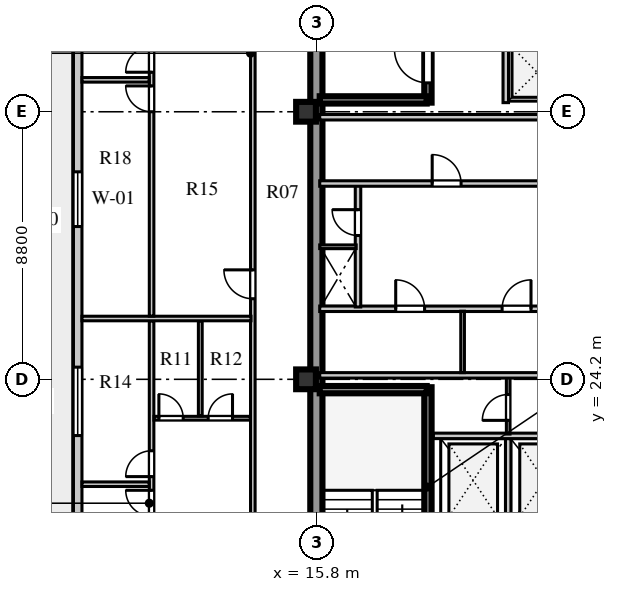
"""IFC4 building model, lengths in metres.
Left out: names, types, materials, properties, quantities, classifications, styles, units other than length and angle.
Written with IfcOpenShell. Run it as: python <this file> out.ifc"""

import sys

from ifc_helpers import new_model, si_unit, direction, frame, frame_2d, origin, origin_2d, place, context, subcontext, project, spatial, rectangle, extrude, element, fill, save


model = new_model("IFC4")
c1 = context("Model", 3, precision=1e-05, world=origin(), true_north=direction((0.0, 1.0)))
c2 = subcontext(c1, "Body", "Model", "MODEL_VIEW")
j1 = project(units=[si_unit("LENGTHUNIT", "METRE"), si_unit("PLANEANGLEUNIT", "RADIAN")], contexts=[c1])
p1 = place(None, origin())
s1 = spatial("IfcSite", under=j1, at=p1, CompositionType="ELEMENT")
p2 = place(p1, origin())
s2 = spatial("IfcBuilding", under=s1, at=p2, CompositionType="ELEMENT")
p3 = place(p2, frame((0.0, 0.0, 237.5)))
s3 = spatial("IfcBuildingStorey", under=s2, at=p3, CompositionType="ELEMENT", Elevation=237.5)
p4 = place(p3, frame((15.79, 15.81, 0.0), z_axis=(0.0, 0.0, 1.0), x_axis=(0.0, 1.0, 0.0)))
e1 = element("IfcWall", 1, at=p4, inside=s3, PredefinedType="SHEAR", context=c2, shape_type="SweptSolid", body=[
    extrude(rectangle(XDim=25.63, YDim=0.4, at=frame_2d((12.815, 0.0))), origin(), (0.0, 0.0, 1.0), 3.66),
])
for number, where, z_axis, x_axis in (
    (2, (15.45, 24.2, 0.0), (0.0, 0.0, 1.0), (1.0, 0.0, 0.0)),
    (3, (15.45, 33.0, 0.0), (0.0, 0.0, 1.0), (1.0, 0.0, 0.0)),
):
    element("IfcColumn", number, at=place(p3, frame(where, z_axis=z_axis, x_axis=x_axis)), inside=s3, PredefinedType="COLUMN", context=c2, shape_type="SweptSolid", body=[
        extrude(rectangle(XDim=0.65, YDim=0.65, at=origin_2d()), origin(), (0.0, 0.0, 1.0), 3.66),
    ])
p5 = place(p3, frame((7.94, 44.07, 0.0), z_axis=(0.0, 0.0, 1.0), x_axis=(0.0, -1.0, 0.0)))
e4 = element("IfcWall", 4, at=p5, inside=s3, PredefinedType="STANDARD", context=c2, shape_type="SweptSolid", body=[
    extrude(rectangle(XDim=30.94, YDim=0.28, at=frame_2d((15.47, 0.0))), origin(), (0.0, 0.0, 1.0), 3.66),
])
p6 = place(p5, frame((29.325, 0.0, 0.8)))
e5 = element("IfcOpeningElement", 5, at=p6, cuts=e4, PredefinedType="OPENING", context=c2, shape_type="SweptSolid", body=[
    extrude(rectangle(XDim=0.95, YDim=1.65, at=frame_2d((0.475, 0.825))), frame((0.0, 0.15, 0.0), z_axis=(0.0, -1.0, 0.0), x_axis=(1.0, 0.0, 0.0)), (0.0, 0.0, 1.0), 0.3),
])
p7 = place(p5, frame((27.28, 0.0, 0.0)))
e6 = element("IfcOpeningElement", 6, at=p7, cuts=e4, PredefinedType="OPENING", context=c2, shape_type="SweptSolid", body=[
    extrude(rectangle(XDim=1.0, YDim=2.05, at=frame_2d((0.5, 1.025))), frame((0.0, 0.15, 0.0), z_axis=(0.0, -1.0, 0.0), x_axis=(1.0, 0.0, 0.0)), (0.0, 0.0, 1.0), 0.3),
])
p8 = place(p5, frame((24.295, 0.0, 0.8)))
e7 = element("IfcOpeningElement", 7, at=p8, cuts=e4, PredefinedType="OPENING", context=c2, shape_type="SweptSolid", body=[
    extrude(rectangle(XDim=1.95, YDim=2.0, at=frame_2d((0.975, 1.0))), frame((0.0, 0.15, 0.0), z_axis=(0.0, -1.0, 0.0), x_axis=(1.0, 0.0, 0.0)), (0.0, 0.0, 1.0), 0.3),
])
p9 = place(p5, frame((19.47, 0.0, 0.8)))
e8 = element("IfcOpeningElement", 8, at=p9, cuts=e4, PredefinedType="OPENING", context=c2, shape_type="SweptSolid", body=[
    extrude(rectangle(XDim=2.25, YDim=2.0, at=frame_2d((1.125, 1.0))), frame((0.0, 0.15, 0.0), z_axis=(0.0, -1.0, 0.0), x_axis=(1.0, 0.0, 0.0)), (0.0, 0.0, 1.0), 0.3),
])
p10 = place(p5, frame((13.045, 0.0, 0.8)))
e9 = element("IfcOpeningElement", 9, at=p10, cuts=e4, PredefinedType="OPENING", context=c2, shape_type="SweptSolid", body=[
    extrude(rectangle(XDim=1.8, YDim=2.0, at=frame_2d((0.9, 1.0))), frame((0.0, 0.15, 0.0), z_axis=(0.0, -1.0, 0.0), x_axis=(1.0, 0.0, 0.0)), (0.0, 0.0, 1.0), 0.3),
])
p11 = place(p5, frame((5.345, 0.0, 0.8)))
e10 = element("IfcOpeningElement", 10, at=p11, cuts=e4, PredefinedType="OPENING", context=c2, shape_type="SweptSolid", body=[
    extrude(rectangle(XDim=1.5, YDim=2.0, at=frame_2d((0.75, 1.0))), frame((0.0, 0.15, 0.0), z_axis=(0.0, -1.0, 0.0), x_axis=(1.0, 0.0, 0.0)), (0.0, 0.0, 1.0), 0.3),
])
p12 = place(p5, frame((0.665, 0.0, 0.8)))
e11 = element("IfcOpeningElement", 11, at=p12, cuts=e4, PredefinedType="OPENING", context=c2, shape_type="SweptSolid", body=[
    extrude(rectangle(XDim=0.95, YDim=1.65, at=frame_2d((0.475, 0.825))), frame((0.0, 0.15, 0.0), z_axis=(0.0, -1.0, 0.0), x_axis=(1.0, 0.0, 0.0)), (0.0, 0.0, 1.0), 0.3),
])
p13 = place(p3, frame((19.46, 15.74, 0.0), z_axis=(0.0, 0.0, 1.0), x_axis=(0.0, 1.0, 0.0)))
e12 = element("IfcWall", 12, at=p13, inside=s3, PredefinedType="SHEAR", context=c2, shape_type="SweptSolid", body=[
    extrude(rectangle(XDim=8.2, YDim=0.24, at=frame_2d((4.1, 0.0))), origin(), (0.0, 0.0, 1.0), 3.9),
])
p14 = place(p13, frame((0.45, 0.0, 0.0)))
e13 = element("IfcOpeningElement", 13, at=p14, cuts=e12, PredefinedType="OPENING", context=c2, shape_type="SweptSolid", body=[
    extrude(rectangle(XDim=1.1, YDim=2.1, at=frame_2d((0.55, 1.05))), frame((0.0, 0.13, 0.0), z_axis=(0.0, -1.0, 0.0), x_axis=(1.0, 0.0, 0.0)), (0.0, 0.0, 1.0), 0.26),
])
p15 = place(p3, frame((15.9, 23.86, 0.0), z_axis=(0.0, 0.0, 1.0), x_axis=(1.0, 0.0, 0.0)))
e14 = element("IfcWall", 14, at=p15, inside=s3, PredefinedType="SHEAR", context=c2, shape_type="SweptSolid", body=[
    extrude(rectangle(XDim=3.52, YDim=0.24, at=frame_2d((1.76, 0.0))), origin(), (0.0, 0.0, 1.0), 3.9),
])
p16 = place(p3, frame((22.1, 19.51, 0.0), z_axis=(0.0, 0.0, 1.0), x_axis=(0.0, 1.0, 0.0)))
e15 = element("IfcWall", 15, at=p16, inside=s3, PredefinedType="SOLIDWALL", context=c2, shape_type="SweptSolid", body=[
    extrude(rectangle(XDim=2.74, YDim=0.18, at=frame_2d((1.37, 0.0))), origin(), (0.0, 0.0, 1.0), 3.66),
])
p17 = place(p3, frame((19.64, 22.34, 0.0), z_axis=(0.0, 0.0, 1.0), x_axis=(1.0, 0.0, 0.0)))
e16 = element("IfcWall", 16, at=p17, inside=s3, PredefinedType="SOLIDWALL", context=c2, shape_type="SweptSolid", body=[
    extrude(rectangle(XDim=4.94, YDim=0.18, at=frame_2d((2.47, 0.0))), origin(), (0.0, 0.0, 1.0), 3.66),
])
p18 = place(p3, frame((22.1, 22.4, 0.0), z_axis=(0.0, 0.0, 1.0), x_axis=(0.0, 1.0, 0.0)))
e17 = element("IfcWall", 17, at=p18, inside=s3, PredefinedType="PARTITIONING", context=c2, shape_type="SweptSolid", body=[
    extrude(rectangle(XDim=1.88, YDim=0.12, at=frame_2d((0.94, 0.0))), origin(), (0.0, 0.0, 1.0), 3.66),
])
p19 = place(p18, frame((0.45, 0.0, 0.0)))
e18 = element("IfcOpeningElement", 18, at=p19, cuts=e17, PredefinedType="OPENING", context=c2, shape_type="SweptSolid", body=[
    extrude(rectangle(XDim=0.85, YDim=2.06, at=frame_2d((0.425, 1.03))), frame((0.0, 0.07, 0.0), z_axis=(0.0, -1.0, 0.0), x_axis=(1.0, 0.0, 0.0)), (0.0, 0.0, 1.0), 0.14),
])
p20 = place(p3, frame((15.9, 26.52, 0.0), z_axis=(0.0, 0.0, 1.0), x_axis=(1.0, 0.0, 0.0)))
e19 = element("IfcWall", 19, at=p20, inside=s3, PredefinedType="SOLIDWALL", context=c2, shape_type="SweptSolid", body=[
    extrude(rectangle(XDim=8.68, YDim=0.18, at=frame_2d((4.34, 0.0))), origin(), (0.0, 0.0, 1.0), 3.66),
])
p21 = place(p20, frame((2.5, 0.0, 0.0)))
e20 = element("IfcOpeningElement", 20, at=p21, cuts=e19, PredefinedType="OPENING", context=c2, shape_type="SweptSolid", body=[
    extrude(rectangle(XDim=0.95, YDim=2.1, at=frame_2d((0.475, 1.05))), frame((0.0, 0.1, 0.0), z_axis=(0.0, -1.0, 0.0), x_axis=(1.0, 0.0, 0.0)), (0.0, 0.0, 1.0), 0.2),
])
p22 = place(p20, frame((6.0, 0.0, 0.0)))
e21 = element("IfcOpeningElement", 21, at=p22, cuts=e19, PredefinedType="OPENING", context=c2, shape_type="SweptSolid", body=[
    extrude(rectangle(XDim=0.95, YDim=2.1, at=frame_2d((0.475, 1.05))), frame((0.0, 0.1, 0.0), z_axis=(0.0, -1.0, 0.0), x_axis=(1.0, 0.0, 0.0)), (0.0, 0.0, 1.0), 0.2),
])
p23 = place(p3, frame((15.9, 24.33, 0.0), z_axis=(0.0, 0.0, 1.0), x_axis=(1.0, 0.0, 0.0)))
e22 = element("IfcWall", 22, at=p23, inside=s3, PredefinedType="SOLIDWALL", context=c2, shape_type="SweptSolid", body=[
    extrude(rectangle(XDim=8.68, YDim=0.18, at=frame_2d((4.34, 0.0))), origin(), (0.0, 0.0, 1.0), 3.06),
])
p24 = place(p3, frame((20.6, 24.42, 0.0), z_axis=(0.0, 0.0, 1.0), x_axis=(0.0, 1.0, 0.0)))
e23 = element("IfcWall", 23, at=p24, inside=s3, PredefinedType="PARTITIONING", context=c2, shape_type="SweptSolid", body=[
    extrude(rectangle(XDim=2.02, YDim=0.12, at=frame_2d((1.01, 0.0))), origin(), (0.0, 0.0, 1.0), 3.66),
])
p25 = place(p3, frame((17.16, 26.58, 0.0), z_axis=(0.0, 0.0, 1.0), x_axis=(0.0, 1.0, 0.0)))
e24 = element("IfcWall", 24, at=p25, inside=s3, PredefinedType="SOLIDWALL", context=c2, shape_type="SweptSolid", body=[
    extrude(rectangle(XDim=4.02, YDim=0.18, at=frame_2d((2.01, 0.0))), origin(), (0.0, 0.0, 1.0), 3.66),
])
p26 = place(p25, frame((2.35, 0.0, 0.0)))
e25 = element("IfcOpeningElement", 25, at=p26, cuts=e24, PredefinedType="OPENING", context=c2, shape_type="SweptSolid", body=[
    extrude(rectangle(XDim=0.85, YDim=2.06, at=frame_2d((0.425, 1.03))), frame((0.0, 0.1, 0.0), z_axis=(0.0, -1.0, 0.0), x_axis=(1.0, 0.0, 0.0)), (0.0, 0.0, 1.0), 0.2),
])
p27 = place(p3, frame((15.9, 28.56, 0.0), z_axis=(0.0, 0.0, 1.0), x_axis=(1.0, 0.0, 0.0)))
e26 = element("IfcWall", 26, at=p27, inside=s3, PredefinedType="PARTITIONING", context=c2, shape_type="SweptSolid", body=[
    extrude(rectangle(XDim=1.2, YDim=0.12, at=frame_2d((0.6, 0.0))), origin(), (0.0, 0.0, 1.0), 3.66),
])
p28 = place(p3, frame((15.9, 30.64, 0.0), z_axis=(0.0, 0.0, 1.0), x_axis=(1.0, 0.0, 0.0)))
e27 = element("IfcWall", 27, at=p28, inside=s3, PredefinedType="SOLIDWALL", context=c2, shape_type="SweptSolid", body=[
    extrude(rectangle(XDim=8.68, YDim=0.18, at=frame_2d((4.34, 0.0))), origin(), (0.0, 0.0, 1.0), 3.66),
])
p29 = place(p28, frame((3.7, 0.0, 0.0)))
e28 = element("IfcOpeningElement", 28, at=p29, cuts=e27, PredefinedType="OPENING", context=c2, shape_type="SweptSolid", body=[
    extrude(rectangle(XDim=0.95, YDim=2.1, at=frame_2d((0.475, 1.05))), frame((0.0, 0.1, 0.0), z_axis=(0.0, -1.0, 0.0), x_axis=(1.0, 0.0, 0.0)), (0.0, 0.0, 1.0), 0.2),
])
p30 = place(p3, frame((15.9, 32.82, 0.0), z_axis=(0.0, 0.0, 1.0), x_axis=(1.0, 0.0, 0.0)))
e29 = element("IfcWall", 29, at=p30, inside=s3, PredefinedType="SOLIDWALL", context=c2, shape_type="SweptSolid", body=[
    extrude(rectangle(XDim=8.68, YDim=0.18, at=frame_2d((4.34, 0.0))), origin(), (0.0, 0.0, 1.0), 3.06),
])
p31 = place(p3, frame((19.46, 33.3, 0.0), z_axis=(0.0, 0.0, 1.0), x_axis=(0.0, 1.0, 0.0)))
e30 = element("IfcWall", 30, at=p31, inside=s3, PredefinedType="SHEAR", context=c2, shape_type="SweptSolid", body=[
    extrude(rectangle(XDim=8.18, YDim=0.24, at=frame_2d((4.09, 0.0))), origin(), (0.0, 0.0, 1.0), 3.9),
])
p32 = place(p31, frame((0.65, 0.0, 0.0)))
e31 = element("IfcOpeningElement", 31, at=p32, cuts=e30, PredefinedType="OPENING", context=c2, shape_type="SweptSolid", body=[
    extrude(rectangle(XDim=1.1, YDim=2.1, at=frame_2d((0.55, 1.05))), frame((0.0, 0.13, 0.0), z_axis=(0.0, -1.0, 0.0), x_axis=(1.0, 0.0, 0.0)), (0.0, 0.0, 1.0), 0.26),
])
p33 = place(p3, frame((15.9, 33.39, 0.0), z_axis=(0.0, 0.0, 1.0), x_axis=(1.0, 0.0, 0.0)))
e32 = element("IfcWall", 32, at=p33, inside=s3, PredefinedType="SHEAR", context=c2, shape_type="SweptSolid", body=[
    extrude(rectangle(XDim=3.52, YDim=0.24, at=frame_2d((1.76, 0.0))), origin(), (0.0, 0.0, 1.0), 3.9),
])
p34 = place(p3, frame((22.02, 33.3, 0.0), z_axis=(0.0, 0.0, 1.0), x_axis=(0.0, 1.0, 0.0)))
e33 = element("IfcWall", 33, at=p34, inside=s3, PredefinedType="SOLIDWALL", context=c2, shape_type="SweptSolid", body=[
    extrude(rectangle(XDim=2.01, YDim=0.18, at=frame_2d((1.005, 0.0))), origin(), (0.0, 0.0, 1.0), 3.66),
])
p35 = place(p3, frame((13.7, 15.3, 0.0), z_axis=(0.0, 0.0, 1.0), x_axis=(0.0, 1.0, 0.0)))
e34 = element("IfcWall", 34, at=p35, inside=s3, PredefinedType="PARTITIONING", context=c2, shape_type="SweptSolid", body=[
    extrude(rectangle(XDim=26.6, YDim=0.15, at=frame_2d((13.3, 0.0))), origin(), (0.0, 0.0, 1.0), 3.66),
])
p36 = place(p35, frame((0.65, 0.0, 0.0)))
e35 = element("IfcOpeningElement", 35, at=p36, cuts=e34, PredefinedType="OPENING", context=c2, shape_type="SweptSolid", body=[
    extrude(rectangle(XDim=0.95, YDim=2.1, at=frame_2d((0.475, 1.05))), frame((0.0, 0.085, 0.0), z_axis=(0.0, -1.0, 0.0), x_axis=(1.0, 0.0, 0.0)), (0.0, 0.0, 1.0), 0.17),
])
p37 = place(p35, frame((11.55, 0.0, 0.0)))
e36 = element("IfcOpeningElement", 36, at=p37, cuts=e34, PredefinedType="OPENING", context=c2, shape_type="SweptSolid", body=[
    extrude(rectangle(XDim=0.95, YDim=2.1, at=frame_2d((0.475, 1.05))), frame((0.0, 0.085, 0.0), z_axis=(0.0, -1.0, 0.0), x_axis=(1.0, 0.0, 0.0)), (0.0, 0.0, 1.0), 0.17),
])
p38 = place(p3, frame((10.37, 15.38, 0.0), z_axis=(0.0, 0.0, 1.0), x_axis=(0.0, 1.0, 0.0)))
e37 = element("IfcWall", 37, at=p38, inside=s3, PredefinedType="PARTITIONING", context=c2, shape_type="SweptSolid", body=[
    extrude(rectangle(XDim=10.74, YDim=0.15, at=frame_2d((5.37, 0.0))), origin(), (0.0, 0.0, 1.0), 3.66),
])
p39 = place(p38, frame((4.32, 0.0, 0.0)))
e38 = element("IfcOpeningElement", 38, at=p39, cuts=e37, PredefinedType="OPENING", context=c2, shape_type="SweptSolid", body=[
    extrude(rectangle(XDim=0.85, YDim=2.08, at=frame_2d((0.425, 1.04))), frame((0.0, 0.085, 0.0), z_axis=(0.0, -1.0, 0.0), x_axis=(1.0, 0.0, 0.0)), (0.0, 0.0, 1.0), 0.17),
])
p40 = place(p38, frame((5.62, 0.0, 0.0)))
e39 = element("IfcOpeningElement", 39, at=p40, cuts=e37, PredefinedType="OPENING", context=c2, shape_type="SweptSolid", body=[
    extrude(rectangle(XDim=0.85, YDim=2.08, at=frame_2d((0.425, 1.04))), frame((0.0, 0.085, 0.0), z_axis=(0.0, -1.0, 0.0), x_axis=(1.0, 0.0, 0.0)), (0.0, 0.0, 1.0), 0.17),
])
p41 = place(p3, frame((10.45, 22.92, 0.0), z_axis=(0.0, 0.0, 1.0), x_axis=(1.0, 0.0, 0.0)))
e40 = element("IfcWall", 40, at=p41, inside=s3, PredefinedType="PLUMBINGWALL", context=c2, shape_type="SweptSolid", body=[
    extrude(rectangle(XDim=3.17, YDim=0.125, at=frame_2d((1.585, 0.0))), origin(), (0.0, 0.0, 1.0), 3.66),
])
p42 = place(p41, frame((0.16, 0.0, 0.0)))
e41 = element("IfcOpeningElement", 41, at=p42, cuts=e40, PredefinedType="OPENING", context=c2, shape_type="SweptSolid", body=[
    extrude(rectangle(XDim=0.8, YDim=2.05, at=frame_2d((0.4, 1.025))), frame((0.0, 0.073, 0.0), z_axis=(0.0, -1.0, 0.0), x_axis=(1.0, 0.0, 0.0)), (0.0, 0.0, 1.0), 0.145),
])
p43 = place(p41, frame((1.782, 0.0, 0.0)))
e42 = element("IfcOpeningElement", 42, at=p43, cuts=e40, PredefinedType="OPENING", context=c2, shape_type="SweptSolid", body=[
    extrude(rectangle(XDim=0.8, YDim=2.05, at=frame_2d((0.4, 1.025))), frame((0.0, 0.073, 0.0), z_axis=(0.0, -1.0, 0.0), x_axis=(1.0, 0.0, 0.0)), (0.0, 0.0, 1.0), 0.145),
])
p44 = place(p3, frame((11.972, 23.0, 0.0), z_axis=(0.0, 0.0, 1.0), x_axis=(0.0, 1.0, 0.0)))
e43 = element("IfcWall", 43, at=p44, inside=s3, PredefinedType="PLUMBINGWALL", context=c2, shape_type="SweptSolid", body=[
    extrude(rectangle(XDim=3.12, YDim=0.125, at=frame_2d((1.56, 0.0))), origin(), (0.0, 0.0, 1.0), 3.66),
])
p45 = place(p3, frame((8.08, 20.75, 0.0), z_axis=(0.0, 0.0, 1.0), x_axis=(1.0, 0.0, 0.0)))
e44 = element("IfcWall", 44, at=p45, inside=s3, PredefinedType="PARTITIONING", context=c2, shape_type="SweptSolid", body=[
    extrude(rectangle(XDim=2.21, YDim=0.15, at=frame_2d((1.105, 0.0))), origin(), (0.0, 0.0, 1.0), 3.66),
])
p46 = place(p3, frame((8.08, 26.2, 0.0), z_axis=(0.0, 0.0, 1.0), x_axis=(1.0, 0.0, 0.0)))
e45 = element("IfcWall", 45, at=p46, inside=s3, PredefinedType="PARTITIONING", context=c2, shape_type="SweptSolid", body=[
    extrude(rectangle(XDim=5.56, YDim=0.15, at=frame_2d((2.78, 0.0))), origin(), (0.0, 0.0, 1.0), 3.66),
])
p47 = place(p3, frame((10.37, 26.28, 0.0), z_axis=(0.0, 0.0, 1.0), x_axis=(0.0, 1.0, 0.0)))
e46 = element("IfcWall", 46, at=p47, inside=s3, PredefinedType="PARTITIONING", context=c2, shape_type="SweptSolid", body=[
    extrude(rectangle(XDim=15.54, YDim=0.15, at=frame_2d((7.77, 0.0))), origin(), (0.0, 0.0, 1.0), 3.66),
])
p48 = place(p47, frame((6.72, 0.0, 0.0)))
e47 = element("IfcOpeningElement", 47, at=p48, cuts=e46, PredefinedType="OPENING", context=c2, shape_type="SweptSolid", body=[
    extrude(rectangle(XDim=0.85, YDim=2.08, at=frame_2d((0.425, 1.04))), frame((0.0, 0.085, 0.0), z_axis=(0.0, -1.0, 0.0), x_axis=(1.0, 0.0, 0.0)), (0.0, 0.0, 1.0), 0.17),
])
p49 = place(p47, frame((8.02, 0.0, 0.0)))
e48 = element("IfcOpeningElement", 48, at=p49, cuts=e46, PredefinedType="OPENING", context=c2, shape_type="SweptSolid", body=[
    extrude(rectangle(XDim=0.85, YDim=2.08, at=frame_2d((0.425, 1.04))), frame((0.0, 0.085, 0.0), z_axis=(0.0, -1.0, 0.0), x_axis=(1.0, 0.0, 0.0)), (0.0, 0.0, 1.0), 0.17),
])
p50 = place(p3, frame((8.08, 34.05, 0.0), z_axis=(0.0, 0.0, 1.0), x_axis=(1.0, 0.0, 0.0)))
e49 = element("IfcWall", 49, at=p50, inside=s3, PredefinedType="PARTITIONING", context=c2, shape_type="SweptSolid", body=[
    extrude(rectangle(XDim=2.21, YDim=0.15, at=frame_2d((1.105, 0.0))), origin(), (0.0, 0.0, 1.0), 3.66),
])
p51 = place(p9, origin())
e50 = element("IfcWindow", 50, at=p51, inside=s3, PartitioningType="SINGLE_PANEL", PredefinedType="WINDOW", context=c2, shape_type="SweptSolid", body=[
    extrude(rectangle(XDim=2.25, YDim=2.0, at=frame_2d((1.125, 1.0))), frame((0.0, 0.03, 0.0), z_axis=(0.0, -1.0, 0.0), x_axis=(1.0, 0.0, 0.0)), (0.0, 0.0, 1.0), 0.06),
])
fill(e8, e50)
p52 = place(p10, origin())
e51 = element("IfcWindow", 51, at=p52, inside=s3, PartitioningType="SINGLE_PANEL", PredefinedType="WINDOW", context=c2, shape_type="SweptSolid", body=[
    extrude(rectangle(XDim=1.8, YDim=2.0, at=frame_2d((0.9, 1.0))), frame((0.0, 0.03, 0.0), z_axis=(0.0, -1.0, 0.0), x_axis=(1.0, 0.0, 0.0)), (0.0, 0.0, 1.0), 0.06),
])
fill(e9, e51)
p53 = place(p19, origin())
e52 = element("IfcDoor", 52, at=p53, inside=s3, OperationType="SINGLE_SWING_LEFT", PredefinedType="DOOR", context=c2, shape_type="SweptSolid", body=[
    extrude(rectangle(XDim=0.85, YDim=2.06, at=frame_2d((0.425, 1.03))), frame((0.0, 0.025, 0.0), z_axis=(0.0, -1.0, 0.0), x_axis=(1.0, 0.0, 0.0)), (0.0, 0.0, 1.0), 0.05),
])
fill(e18, e52)
p54 = place(p21, origin())
e53 = element("IfcDoor", 53, at=p54, inside=s3, OperationType="SINGLE_SWING_LEFT", PredefinedType="DOOR", context=c2, shape_type="SweptSolid", body=[
    extrude(rectangle(XDim=0.95, YDim=2.1, at=frame_2d((0.475, 1.05))), frame((0.0, 0.025, 0.0), z_axis=(0.0, -1.0, 0.0), x_axis=(1.0, 0.0, 0.0)), (0.0, 0.0, 1.0), 0.05),
])
fill(e20, e53)
p55 = place(p22, origin())
e54 = element("IfcDoor", 54, at=p55, inside=s3, OperationType="SINGLE_SWING_RIGHT", PredefinedType="DOOR", context=c2, shape_type="SweptSolid", body=[
    extrude(rectangle(XDim=0.95, YDim=2.1, at=frame_2d((0.475, 1.05))), frame((0.0, 0.025, 0.0), z_axis=(0.0, -1.0, 0.0), x_axis=(1.0, 0.0, 0.0)), (0.0, 0.0, 1.0), 0.05),
])
fill(e21, e54)
p56 = place(p26, origin())
e55 = element("IfcDoor", 55, at=p56, inside=s3, OperationType="SINGLE_SWING_RIGHT", PredefinedType="DOOR", context=c2, shape_type="SweptSolid", body=[
    extrude(rectangle(XDim=0.85, YDim=2.06, at=frame_2d((0.425, 1.03))), frame((0.0, 0.025, 0.0), z_axis=(0.0, -1.0, 0.0), x_axis=(1.0, 0.0, 0.0)), (0.0, 0.0, 1.0), 0.05),
])
fill(e25, e55)
p57 = place(p29, frame((0.95, 0.0, 0.0), z_axis=(0.0, 0.0, 1.0), x_axis=(-1.0, 0.0, 0.0)))
e56 = element("IfcDoor", 56, at=p57, inside=s3, OperationType="SINGLE_SWING_RIGHT", PredefinedType="DOOR", context=c2, shape_type="SweptSolid", body=[
    extrude(rectangle(XDim=0.95, YDim=2.1, at=frame_2d((0.475, 1.05))), frame((0.0, 0.025, 0.0), z_axis=(0.0, -1.0, 0.0), x_axis=(1.0, 0.0, 0.0)), (0.0, 0.0, 1.0), 0.05),
])
fill(e28, e56)
p58 = place(p32, origin())
e57 = element("IfcDoor", 57, at=p58, inside=s3, OperationType="SINGLE_SWING_RIGHT", PredefinedType="DOOR", context=c2, shape_type="SweptSolid", body=[
    extrude(rectangle(XDim=1.1, YDim=2.1, at=frame_2d((0.55, 1.05))), frame((0.0, 0.025, 0.0), z_axis=(0.0, -1.0, 0.0), x_axis=(1.0, 0.0, 0.0)), (0.0, 0.0, 1.0), 0.05),
])
fill(e31, e57)
p59 = place(p42, origin())
e58 = element("IfcDoor", 58, at=p59, inside=s3, OperationType="SINGLE_SWING_LEFT", PredefinedType="DOOR", context=c2, shape_type="SweptSolid", body=[
    extrude(rectangle(XDim=0.8, YDim=2.05, at=frame_2d((0.4, 1.025))), frame((0.0, 0.025, 0.0), z_axis=(0.0, -1.0, 0.0), x_axis=(1.0, 0.0, 0.0)), (0.0, 0.0, 1.0), 0.05),
])
fill(e41, e58)
p60 = place(p43, origin())
e59 = element("IfcDoor", 59, at=p60, inside=s3, OperationType="SINGLE_SWING_RIGHT", PredefinedType="DOOR", context=c2, shape_type="SweptSolid", body=[
    extrude(rectangle(XDim=0.8, YDim=2.05, at=frame_2d((0.4, 1.025))), frame((0.0, 0.025, 0.0), z_axis=(0.0, -1.0, 0.0), x_axis=(1.0, 0.0, 0.0)), (0.0, 0.0, 1.0), 0.05),
])
fill(e42, e59)
p61 = place(p39, frame((0.85, 0.0, 0.0), z_axis=(0.0, 0.0, 1.0), x_axis=(-1.0, 0.0, 0.0)))
e60 = element("IfcDoor", 60, at=p61, inside=s3, OperationType="SINGLE_SWING_LEFT", PredefinedType="DOOR", context=c2, shape_type="SweptSolid", body=[
    extrude(rectangle(XDim=0.85, YDim=2.08, at=frame_2d((0.425, 1.04))), frame((0.0, 0.025, 0.0), z_axis=(0.0, -1.0, 0.0), x_axis=(1.0, 0.0, 0.0)), (0.0, 0.0, 1.0), 0.05),
])
fill(e38, e60)
p62 = place(p40, frame((0.85, 0.0, 0.0), z_axis=(0.0, 0.0, 1.0), x_axis=(-1.0, 0.0, 0.0)))
e61 = element("IfcDoor", 61, at=p62, inside=s3, OperationType="SINGLE_SWING_RIGHT", PredefinedType="DOOR", context=c2, shape_type="SweptSolid", body=[
    extrude(rectangle(XDim=0.85, YDim=2.08, at=frame_2d((0.425, 1.04))), frame((0.0, 0.025, 0.0), z_axis=(0.0, -1.0, 0.0), x_axis=(1.0, 0.0, 0.0)), (0.0, 0.0, 1.0), 0.05),
])
fill(e39, e61)
p63 = place(p48, frame((0.85, 0.0, 0.0), z_axis=(0.0, 0.0, 1.0), x_axis=(-1.0, 0.0, 0.0)))
e62 = element("IfcDoor", 62, at=p63, inside=s3, OperationType="SINGLE_SWING_LEFT", PredefinedType="DOOR", context=c2, shape_type="SweptSolid", body=[
    extrude(rectangle(XDim=0.85, YDim=2.08, at=frame_2d((0.425, 1.04))), frame((0.0, 0.025, 0.0), z_axis=(0.0, -1.0, 0.0), x_axis=(1.0, 0.0, 0.0)), (0.0, 0.0, 1.0), 0.05),
])
fill(e47, e62)
p64 = place(p49, frame((0.85, 0.0, 0.0), z_axis=(0.0, 0.0, 1.0), x_axis=(-1.0, 0.0, 0.0)))
e63 = element("IfcDoor", 63, at=p64, inside=s3, OperationType="SINGLE_SWING_RIGHT", PredefinedType="DOOR", context=c2, shape_type="SweptSolid", body=[
    extrude(rectangle(XDim=0.85, YDim=2.08, at=frame_2d((0.425, 1.04))), frame((0.0, 0.025, 0.0), z_axis=(0.0, -1.0, 0.0), x_axis=(1.0, 0.0, 0.0)), (0.0, 0.0, 1.0), 0.05),
])
fill(e48, e63)
p65 = place(p37, frame((0.95, 0.0, 0.0), z_axis=(0.0, 0.0, 1.0), x_axis=(-1.0, 0.0, 0.0)))
e64 = element("IfcDoor", 64, at=p65, inside=s3, OperationType="SINGLE_SWING_LEFT", PredefinedType="DOOR", context=c2, shape_type="SweptSolid", body=[
    extrude(rectangle(XDim=0.95, YDim=2.1, at=frame_2d((0.475, 1.05))), frame((0.0, 0.025, 0.0), z_axis=(0.0, -1.0, 0.0), x_axis=(1.0, 0.0, 0.0)), (0.0, 0.0, 1.0), 0.05),
])
fill(e36, e64)
save(model, sys.argv[1])
